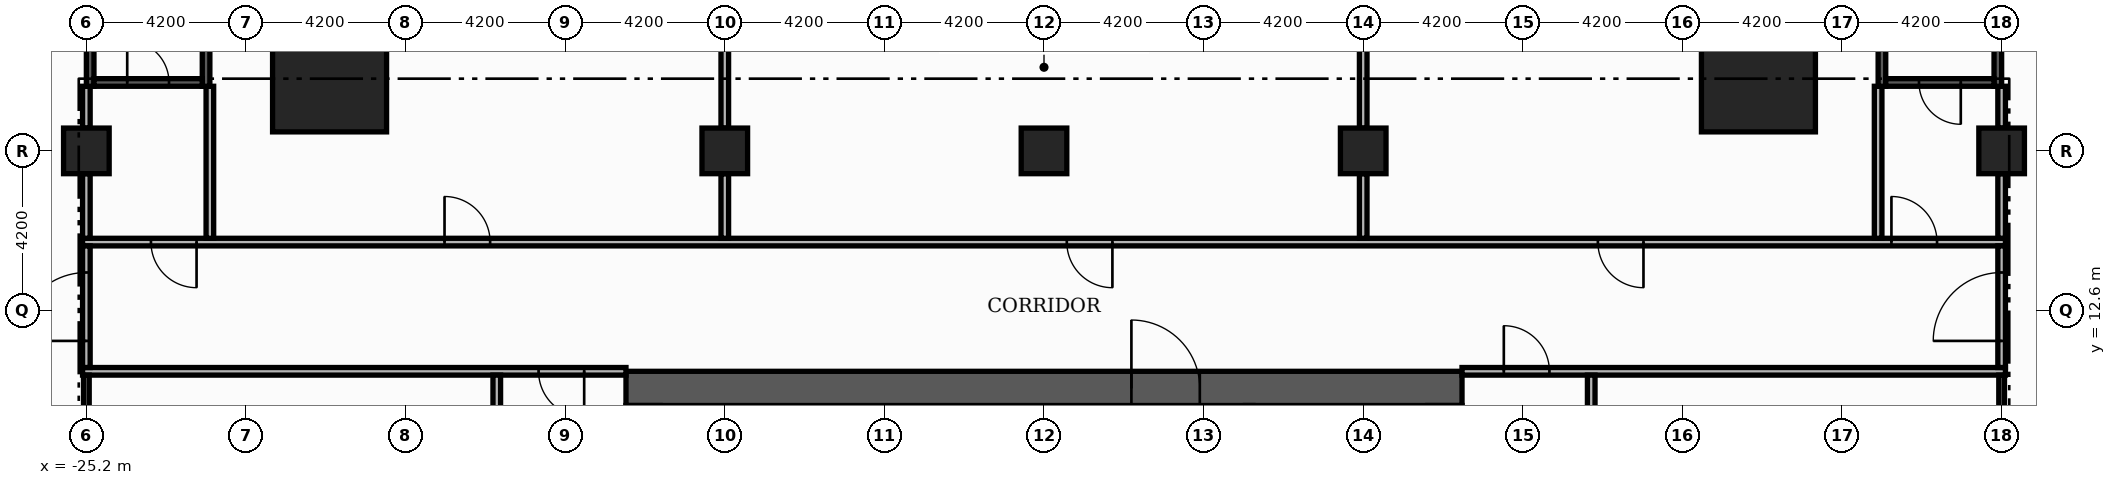
"""IFC4 building model, lengths in metres.
Left out: names, types, materials, properties, quantities, classifications, styles, units other than length and angle.
Written with IfcOpenShell. Run it as: python <this file> out.ifc"""

import sys

from ifc_helpers import new_model, si_unit, direction, frame, frame_2d, origin, origin_2d, place, context, subcontext, project, spatial, rectangle, extrude, element, fill, save


model = new_model("IFC4")
c1 = context("Model", 3, precision=1e-05, world=origin(), true_north=direction((0.0, 1.0)))
c2 = subcontext(c1, "Body", "Model", "MODEL_VIEW")
j1 = project(units=[si_unit("LENGTHUNIT", "METRE"), si_unit("PLANEANGLEUNIT", "RADIAN")], contexts=[c1])
p1 = place(None, origin())
s1 = spatial("IfcSite", under=j1, at=p1, CompositionType="ELEMENT")
p2 = place(p1, origin())
s2 = spatial("IfcBuilding", under=s1, at=p2, CompositionType="ELEMENT")
p3 = place(p2, frame((0.0, 0.0, -4.2)))
s3 = spatial("IfcBuildingStorey", under=s2, at=p3, CompositionType="ELEMENT", Elevation=-4.2)
p4 = place(p3, frame((-11.0, 10.55, 0.0), z_axis=(0.0, 0.0, 1.0), x_axis=(1.0, 0.0, 0.0)))
e1 = element("IfcWall", 1, at=p4, inside=s3, PredefinedType="SHEAR", context=c2, shape_type="SweptSolid", body=[
    extrude(rectangle(XDim=22.0, YDim=0.9, at=frame_2d((11.0, 0.0))), origin(), (0.0, 0.0, 1.0), 3.78),
])
p5 = place(p4, frame((13.3, 0.0, 0.0)))
e2 = element("IfcOpeningElement", 2, at=p5, cuts=e1, PredefinedType="OPENING", context=c2, shape_type="SweptSolid", body=[
    extrude(rectangle(XDim=1.8, YDim=2.2, at=frame_2d((0.9, 1.1))), frame((0.0, 0.46, 0.0), z_axis=(0.0, -1.0, 0.0), x_axis=(1.0, 0.0, 0.0)), (0.0, 0.0, 1.0), 0.92),
])
for number, where, z_axis, x_axis in (
    (3, (18.8, 18.8, 0.0), (0.0, 0.0, 1.0), (1.0, 0.0, 0.0)),
    (4, (-18.8, 18.8, 0.0), (0.0, 0.0, 1.0), (1.0, 0.0, 0.0)),
):
    element("IfcColumn", number, at=place(p3, frame(where, z_axis=z_axis, x_axis=x_axis)), inside=s3, PredefinedType="COLUMN", context=c2, shape_type="SweptSolid", body=[
        extrude(rectangle(XDim=3.0, YDim=3.0, at=origin_2d()), origin(), (0.0, 0.0, 1.0), 4.2),
    ])
for number, where, z_axis, x_axis in (
    (5, (25.2, 16.8, 0.0), (0.0, 0.0, 1.0), (1.0, 0.0, 0.0)),
    (6, (-25.2, 16.8, 0.0), (0.0, 0.0, 1.0), (1.0, 0.0, 0.0)),
    (7, (0.0, 16.8, 0.0), (0.0, 0.0, 1.0), (1.0, 0.0, 0.0)),
    (8, (8.4, 16.8, 0.0), (0.0, 0.0, 1.0), (1.0, 0.0, 0.0)),
    (9, (-8.4, 16.8, 0.0), (0.0, 0.0, 1.0), (1.0, 0.0, 0.0)),
):
    element("IfcColumn", number, at=place(p3, frame(where, z_axis=z_axis, x_axis=x_axis)), inside=s3, PredefinedType="COLUMN", context=c2, shape_type="SweptSolid", body=[
        extrude(rectangle(XDim=1.2, YDim=1.2, at=origin_2d()), origin(), (0.0, 0.0, 1.0), 4.2),
    ])
p6 = place(p3, frame((-25.3, 11.0, 0.0), z_axis=(0.0, 0.0, 1.0), x_axis=(1.0, 0.0, 0.0)))
e10 = element("IfcWall", 10, at=p6, inside=s3, PredefinedType="PARTITIONING", context=c2, shape_type="SweptSolid", body=[
    extrude(rectangle(XDim=14.3, YDim=0.2, at=frame_2d((7.15, 0.0))), origin(), (0.0, 0.0, 1.0), 3.78),
])
p7 = place(p6, frame((12.0, 0.0, 0.0)))
e11 = element("IfcOpeningElement", 11, at=p7, cuts=e10, PredefinedType="OPENING", context=c2, shape_type="SweptSolid", body=[
    extrude(rectangle(XDim=1.2, YDim=2.2, at=frame_2d((0.6, 1.1))), frame((0.0, 0.11, 0.0), z_axis=(0.0, -1.0, 0.0), x_axis=(1.0, 0.0, 0.0)), (0.0, 0.0, 1.0), 0.22),
])
p8 = place(p3, frame((11.0, 11.0, 0.0), z_axis=(0.0, 0.0, 1.0), x_axis=(1.0, 0.0, 0.0)))
e12 = element("IfcWall", 12, at=p8, inside=s3, PredefinedType="PARTITIONING", context=c2, shape_type="SweptSolid", body=[
    extrude(rectangle(XDim=14.3, YDim=0.2, at=frame_2d((7.15, 0.0))), origin(), (0.0, 0.0, 1.0), 3.78),
])
p9 = place(p8, frame((1.1, 0.0, 0.0)))
e13 = element("IfcOpeningElement", 13, at=p9, cuts=e12, PredefinedType="OPENING", context=c2, shape_type="SweptSolid", body=[
    extrude(rectangle(XDim=1.2, YDim=2.2, at=frame_2d((0.6, 1.1))), frame((0.0, 0.11, 0.0), z_axis=(0.0, -1.0, 0.0), x_axis=(1.0, 0.0, 0.0)), (0.0, 0.0, 1.0), 0.22),
])
p10 = place(p3, frame((-25.3, 14.4, 0.0), z_axis=(0.0, 0.0, 1.0), x_axis=(1.0, 0.0, 0.0)))
e14 = element("IfcWall", 14, at=p10, inside=s3, PredefinedType="PARTITIONING", context=c2, shape_type="SweptSolid", body=[
    extrude(rectangle(XDim=50.6, YDim=0.2, at=frame_2d((25.3, 0.0))), origin(), (0.0, 0.0, 1.0), 3.78),
])
p11 = place(p10, frame((1.8, 0.0, 0.0)))
e15 = element("IfcOpeningElement", 15, at=p11, cuts=e14, PredefinedType="OPENING", context=c2, shape_type="SweptSolid", body=[
    extrude(rectangle(XDim=1.2, YDim=2.2, at=frame_2d((0.6, 1.1))), frame((0.0, 0.11, 0.0), z_axis=(0.0, -1.0, 0.0), x_axis=(1.0, 0.0, 0.0)), (0.0, 0.0, 1.0), 0.22),
])
p12 = place(p10, frame((9.525, 0.0, 0.0)))
e16 = element("IfcOpeningElement", 16, at=p12, cuts=e14, PredefinedType="OPENING", context=c2, shape_type="SweptSolid", body=[
    extrude(rectangle(XDim=1.2, YDim=2.2, at=frame_2d((0.6, 1.1))), frame((0.0, 0.11, 0.0), z_axis=(0.0, -1.0, 0.0), x_axis=(1.0, 0.0, 0.0)), (0.0, 0.0, 1.0), 0.22),
])
p13 = place(p10, frame((25.9, 0.0, 0.0)))
e17 = element("IfcOpeningElement", 17, at=p13, cuts=e14, PredefinedType="OPENING", context=c2, shape_type="SweptSolid", body=[
    extrude(rectangle(XDim=1.2, YDim=2.2, at=frame_2d((0.6, 1.1))), frame((0.0, 0.11, 0.0), z_axis=(0.0, -1.0, 0.0), x_axis=(1.0, 0.0, 0.0)), (0.0, 0.0, 1.0), 0.22),
])
p14 = place(p10, frame((39.875, 0.0, 0.0)))
e18 = element("IfcOpeningElement", 18, at=p14, cuts=e14, PredefinedType="OPENING", context=c2, shape_type="SweptSolid", body=[
    extrude(rectangle(XDim=1.2, YDim=2.2, at=frame_2d((0.6, 1.1))), frame((0.0, 0.11, 0.0), z_axis=(0.0, -1.0, 0.0), x_axis=(1.0, 0.0, 0.0)), (0.0, 0.0, 1.0), 0.22),
])
p15 = place(p10, frame((47.6, 0.0, 0.0)))
e19 = element("IfcOpeningElement", 19, at=p15, cuts=e14, PredefinedType="OPENING", context=c2, shape_type="SweptSolid", body=[
    extrude(rectangle(XDim=1.2, YDim=2.2, at=frame_2d((0.6, 1.1))), frame((0.0, 0.11, 0.0), z_axis=(0.0, -1.0, 0.0), x_axis=(1.0, 0.0, 0.0)), (0.0, 0.0, 1.0), 0.22),
])
p16 = place(p3, frame((-25.2, 9.0, 0.0), z_axis=(0.0, 0.0, 1.0), x_axis=(0.0, 1.0, 0.0)))
e20 = element("IfcWall", 20, at=p16, inside=s3, PredefinedType="PARTITIONING", context=c2, shape_type="SweptSolid", body=[
    extrude(rectangle(XDim=1.9, YDim=0.15, at=frame_2d((0.95, 0.0))), origin(), (0.0, 0.0, 1.0), 3.78),
])
p17 = place(p3, frame((-25.2, 11.1, 0.0), z_axis=(0.0, 0.0, 1.0), x_axis=(0.0, 1.0, 0.0)))
e21 = element("IfcWall", 21, at=p17, inside=s3, PredefinedType="PARTITIONING", context=c2, shape_type="SweptSolid", body=[
    extrude(rectangle(XDim=3.2, YDim=0.2, at=frame_2d((1.6, 0.0))), origin(), (0.0, 0.0, 1.0), 3.78),
])
p18 = place(p17, frame((0.7, 0.0, 0.0)))
e22 = element("IfcOpeningElement", 22, at=p18, cuts=e21, PredefinedType="OPENING", context=c2, shape_type="SweptSolid", body=[
    extrude(rectangle(XDim=1.8, YDim=2.2, at=frame_2d((0.9, 1.1))), frame((0.0, 0.11, 0.0), z_axis=(0.0, -1.0, 0.0), x_axis=(1.0, 0.0, 0.0)), (0.0, 0.0, 1.0), 0.22),
])
p19 = place(p3, frame((-25.2, 14.5, 0.0), z_axis=(0.0, 0.0, 1.0), x_axis=(0.0, 1.0, 0.0)))
e23 = element("IfcWall", 23, at=p19, inside=s3, PredefinedType="PARTITIONING", context=c2, shape_type="SweptSolid", body=[
    extrude(rectangle(XDim=1.7, YDim=0.2, at=frame_2d((0.85, 0.0))), origin(), (0.0, 0.0, 1.0), 3.78),
])
p20 = place(p3, frame((-25.2, 17.4, 0.0), z_axis=(0.0, 0.0, 1.0), x_axis=(0.0, 1.0, 0.0)))
e24 = element("IfcWall", 24, at=p20, inside=s3, PredefinedType="PARTITIONING", context=c2, shape_type="SweptSolid", body=[
    extrude(rectangle(XDim=1.1, YDim=0.2, at=frame_2d((0.55, 0.0))), origin(), (0.0, 0.0, 1.0), 3.78),
])
p21 = place(p3, frame((-21.95, 14.5, 0.0), z_axis=(0.0, 0.0, 1.0), x_axis=(0.0, 1.0, 0.0)))
e25 = element("IfcWall", 25, at=p21, inside=s3, PredefinedType="PARTITIONING", context=c2, shape_type="SweptSolid", body=[
    extrude(rectangle(XDim=4.0, YDim=0.2, at=frame_2d((2.0, 0.0))), origin(), (0.0, 0.0, 1.0), 3.78),
])
p22 = place(p3, frame((-14.4, -10.9, 0.0), z_axis=(0.0, 0.0, 1.0), x_axis=(0.0, 1.0, 0.0)))
e26 = element("IfcWall", 26, at=p22, inside=s3, PredefinedType="PARTITIONING", context=c2, shape_type="SweptSolid", body=[
    extrude(rectangle(XDim=21.8, YDim=0.2, at=frame_2d((10.9, 0.0))), origin(), (0.0, 0.0, 1.0), 3.78),
])
p23 = place(p22, frame((4.8, 0.0, 0.0)))
e27 = element("IfcOpeningElement", 27, at=p23, cuts=e26, PredefinedType="OPENING", context=c2, shape_type="SweptSolid", body=[
    extrude(rectangle(XDim=1.2, YDim=2.2, at=frame_2d((0.6, 1.1))), frame((0.0, 0.11, 0.0), z_axis=(0.0, -1.0, 0.0), x_axis=(1.0, 0.0, 0.0)), (0.0, 0.0, 1.0), 0.22),
])
p24 = place(p22, frame((15.8, 0.0, 0.0)))
e28 = element("IfcOpeningElement", 28, at=p24, cuts=e26, PredefinedType="OPENING", context=c2, shape_type="SweptSolid", body=[
    extrude(rectangle(XDim=1.2, YDim=2.2, at=frame_2d((0.6, 1.1))), frame((0.0, 0.11, 0.0), z_axis=(0.0, -1.0, 0.0), x_axis=(1.0, 0.0, 0.0)), (0.0, 0.0, 1.0), 0.22),
])
p25 = place(p3, frame((-8.4, 14.5, 0.0), z_axis=(0.0, 0.0, 1.0), x_axis=(0.0, 1.0, 0.0)))
e29 = element("IfcWall", 29, at=p25, inside=s3, PredefinedType="PARTITIONING", context=c2, shape_type="SweptSolid", body=[
    extrude(rectangle(XDim=1.7, YDim=0.2, at=frame_2d((0.85, 0.0))), origin(), (0.0, 0.0, 1.0), 3.78),
])
p26 = place(p3, frame((-8.4, 17.4, 0.0), z_axis=(0.0, 0.0, 1.0), x_axis=(0.0, 1.0, 0.0)))
e30 = element("IfcWall", 30, at=p26, inside=s3, PredefinedType="PARTITIONING", context=c2, shape_type="SweptSolid", body=[
    extrude(rectangle(XDim=7.2, YDim=0.2, at=frame_2d((3.6, 0.0))), origin(), (0.0, 0.0, 1.0), 3.78),
])
p27 = place(p3, frame((8.4, 14.5, 0.0), z_axis=(0.0, 0.0, 1.0), x_axis=(0.0, 1.0, 0.0)))
e31 = element("IfcWall", 31, at=p27, inside=s3, PredefinedType="PARTITIONING", context=c2, shape_type="SweptSolid", body=[
    extrude(rectangle(XDim=1.7, YDim=0.2, at=frame_2d((0.85, 0.0))), origin(), (0.0, 0.0, 1.0), 3.78),
])
p28 = place(p3, frame((8.4, 17.4, 0.0), z_axis=(0.0, 0.0, 1.0), x_axis=(0.0, 1.0, 0.0)))
e32 = element("IfcWall", 32, at=p28, inside=s3, PredefinedType="PARTITIONING", context=c2, shape_type="SweptSolid", body=[
    extrude(rectangle(XDim=7.2, YDim=0.2, at=frame_2d((3.6, 0.0))), origin(), (0.0, 0.0, 1.0), 3.78),
])
p29 = place(p3, frame((14.4, -10.9, 0.0), z_axis=(0.0, 0.0, 1.0), x_axis=(0.0, 1.0, 0.0)))
e33 = element("IfcWall", 33, at=p29, inside=s3, PredefinedType="PARTITIONING", context=c2, shape_type="SweptSolid", body=[
    extrude(rectangle(XDim=21.8, YDim=0.2, at=frame_2d((10.9, 0.0))), origin(), (0.0, 0.0, 1.0), 3.78),
])
p30 = place(p29, frame((4.8, 0.0, 0.0)))
e34 = element("IfcOpeningElement", 34, at=p30, cuts=e33, PredefinedType="OPENING", context=c2, shape_type="SweptSolid", body=[
    extrude(rectangle(XDim=1.2, YDim=2.2, at=frame_2d((0.6, 1.1))), frame((0.0, 0.11, 0.0), z_axis=(0.0, -1.0, 0.0), x_axis=(1.0, 0.0, 0.0)), (0.0, 0.0, 1.0), 0.22),
])
p31 = place(p29, frame((15.8, 0.0, 0.0)))
e35 = element("IfcOpeningElement", 35, at=p31, cuts=e33, PredefinedType="OPENING", context=c2, shape_type="SweptSolid", body=[
    extrude(rectangle(XDim=1.2, YDim=2.2, at=frame_2d((0.6, 1.1))), frame((0.0, 0.11, 0.0), z_axis=(0.0, -1.0, 0.0), x_axis=(1.0, 0.0, 0.0)), (0.0, 0.0, 1.0), 0.22),
])
p32 = place(p3, frame((21.95, 14.5, 0.0), z_axis=(0.0, 0.0, 1.0), x_axis=(0.0, 1.0, 0.0)))
e36 = element("IfcWall", 36, at=p32, inside=s3, PredefinedType="PARTITIONING", context=c2, shape_type="SweptSolid", body=[
    extrude(rectangle(XDim=4.0, YDim=0.2, at=frame_2d((2.0, 0.0))), origin(), (0.0, 0.0, 1.0), 3.78),
])
p33 = place(p3, frame((25.2, 9.0, 0.0), z_axis=(0.0, 0.0, 1.0), x_axis=(0.0, 1.0, 0.0)))
e37 = element("IfcWall", 37, at=p33, inside=s3, PredefinedType="PARTITIONING", context=c2, shape_type="SweptSolid", body=[
    extrude(rectangle(XDim=1.9, YDim=0.15, at=frame_2d((0.95, 0.0))), origin(), (0.0, 0.0, 1.0), 3.78),
])
p34 = place(p3, frame((25.2, 11.1, 0.0), z_axis=(0.0, 0.0, 1.0), x_axis=(0.0, 1.0, 0.0)))
e38 = element("IfcWall", 38, at=p34, inside=s3, PredefinedType="PARTITIONING", context=c2, shape_type="SweptSolid", body=[
    extrude(rectangle(XDim=3.2, YDim=0.2, at=frame_2d((1.6, 0.0))), origin(), (0.0, 0.0, 1.0), 3.78),
])
p35 = place(p34, frame((0.7, 0.0, 0.0)))
e39 = element("IfcOpeningElement", 39, at=p35, cuts=e38, PredefinedType="OPENING", context=c2, shape_type="SweptSolid", body=[
    extrude(rectangle(XDim=1.8, YDim=2.2, at=frame_2d((0.9, 1.1))), frame((0.0, 0.11, 0.0), z_axis=(0.0, -1.0, 0.0), x_axis=(1.0, 0.0, 0.0)), (0.0, 0.0, 1.0), 0.22),
])
p36 = place(p3, frame((25.2, 14.5, 0.0), z_axis=(0.0, 0.0, 1.0), x_axis=(0.0, 1.0, 0.0)))
e40 = element("IfcWall", 40, at=p36, inside=s3, PredefinedType="PARTITIONING", context=c2, shape_type="SweptSolid", body=[
    extrude(rectangle(XDim=1.7, YDim=0.2, at=frame_2d((0.85, 0.0))), origin(), (0.0, 0.0, 1.0), 3.78),
])
p37 = place(p3, frame((25.2, 17.4, 0.0), z_axis=(0.0, 0.0, 1.0), x_axis=(0.0, 1.0, 0.0)))
e41 = element("IfcWall", 41, at=p37, inside=s3, PredefinedType="PARTITIONING", context=c2, shape_type="SweptSolid", body=[
    extrude(rectangle(XDim=1.1, YDim=0.2, at=frame_2d((0.55, 0.0))), origin(), (0.0, 0.0, 1.0), 3.78),
])
p38 = place(p3, frame((22.05, 18.5, 0.0), z_axis=(0.0, 0.0, 1.0), x_axis=(0.0, 1.0, 0.0)))
e42 = element("IfcWall", 42, at=p38, inside=s3, PredefinedType="SOLIDWALL", context=c2, shape_type="SweptSolid", body=[
    extrude(rectangle(XDim=6.74, YDim=0.2, at=frame_2d((3.37, 0.0))), origin(), (0.0, 0.0, 1.0), 3.78),
])
p39 = place(p3, frame((25.1, 18.5, 0.0), z_axis=(0.0, 0.0, 1.0), x_axis=(0.0, 1.0, 0.0)))
e43 = element("IfcWall", 43, at=p39, inside=s3, PredefinedType="SOLIDWALL", context=c2, shape_type="SweptSolid", body=[
    extrude(rectangle(XDim=6.1, YDim=0.2, at=frame_2d((3.05, 0.0))), origin(), (0.0, 0.0, 1.0), 3.78),
])
p40 = place(p3, frame((22.15, 18.6, 0.0), z_axis=(0.0, 0.0, 1.0), x_axis=(1.0, 0.0, 0.0)))
e44 = element("IfcWall", 44, at=p40, inside=s3, PredefinedType="SOLIDWALL", context=c2, shape_type="SweptSolid", body=[
    extrude(rectangle(XDim=2.85, YDim=0.2, at=frame_2d((1.425, 0.0))), origin(), (0.0, 0.0, 1.0), 3.78),
])
p41 = place(p40, frame((0.875, 0.0, 0.0)))
e45 = element("IfcOpeningElement", 45, at=p41, cuts=e44, PredefinedType="OPENING", context=c2, shape_type="SweptSolid", body=[
    extrude(rectangle(XDim=1.1, YDim=2.2, at=frame_2d((0.55, 1.1))), frame((0.0, 0.11, 0.0), z_axis=(0.0, -1.0, 0.0), x_axis=(1.0, 0.0, 0.0)), (0.0, 0.0, 1.0), 0.22),
])
p42 = place(p3, frame((-25.1, 18.5, 0.0), z_axis=(0.0, 0.0, 1.0), x_axis=(0.0, 1.0, 0.0)))
e46 = element("IfcWall", 46, at=p42, inside=s3, PredefinedType="SOLIDWALL", context=c2, shape_type="SweptSolid", body=[
    extrude(rectangle(XDim=6.1, YDim=0.2, at=frame_2d((3.05, 0.0))), origin(), (0.0, 0.0, 1.0), 3.78),
])
p43 = place(p3, frame((-22.05, 18.5, 0.0), z_axis=(0.0, 0.0, 1.0), x_axis=(0.0, 1.0, 0.0)))
e47 = element("IfcWall", 47, at=p43, inside=s3, PredefinedType="SOLIDWALL", context=c2, shape_type="SweptSolid", body=[
    extrude(rectangle(XDim=6.74, YDim=0.2, at=frame_2d((3.37, 0.0))), origin(), (0.0, 0.0, 1.0), 3.78),
])
p44 = place(p3, frame((-25.0, 18.6, 0.0), z_axis=(0.0, 0.0, 1.0), x_axis=(1.0, 0.0, 0.0)))
e48 = element("IfcWall", 48, at=p44, inside=s3, PredefinedType="SOLIDWALL", context=c2, shape_type="SweptSolid", body=[
    extrude(rectangle(XDim=2.85, YDim=0.2, at=frame_2d((1.425, 0.0))), origin(), (0.0, 0.0, 1.0), 3.78),
])
p45 = place(p44, frame((0.875, 0.0, 0.0)))
e49 = element("IfcOpeningElement", 49, at=p45, cuts=e48, PredefinedType="OPENING", context=c2, shape_type="SweptSolid", body=[
    extrude(rectangle(XDim=1.1, YDim=2.2, at=frame_2d((0.55, 1.1))), frame((0.0, 0.11, 0.0), z_axis=(0.0, -1.0, 0.0), x_axis=(1.0, 0.0, 0.0)), (0.0, 0.0, 1.0), 0.22),
])
p46 = place(p5, origin())
e50 = element("IfcDoor", 50, at=p46, inside=s3, OperationType="DOUBLE_DOOR_SINGLE_SWING", PredefinedType="DOOR", context=c2, shape_type="SweptSolid", body=[
    extrude(rectangle(XDim=1.8, YDim=2.2, at=frame_2d((0.9, 1.1))), frame((0.0, 0.025, 0.0), z_axis=(0.0, -1.0, 0.0), x_axis=(1.0, 0.0, 0.0)), (0.0, 0.0, 1.0), 0.05),
])
fill(e2, e50)
p47 = place(p7, origin())
e51 = element("IfcDoor", 51, at=p47, inside=s3, OperationType="SINGLE_SWING_RIGHT", PredefinedType="DOOR", context=c2, shape_type="SweptSolid", body=[
    extrude(rectangle(XDim=1.2, YDim=2.2, at=frame_2d((0.6, 1.1))), frame((0.0, 0.025, 0.0), z_axis=(0.0, -1.0, 0.0), x_axis=(1.0, 0.0, 0.0)), (0.0, 0.0, 1.0), 0.05),
])
fill(e11, e51)
p48 = place(p9, origin())
e52 = element("IfcDoor", 52, at=p48, inside=s3, OperationType="SINGLE_SWING_LEFT", PredefinedType="DOOR", context=c2, shape_type="SweptSolid", body=[
    extrude(rectangle(XDim=1.2, YDim=2.2, at=frame_2d((0.6, 1.1))), frame((0.0, 0.025, 0.0), z_axis=(0.0, -1.0, 0.0), x_axis=(1.0, 0.0, 0.0)), (0.0, 0.0, 1.0), 0.05),
])
fill(e13, e52)
p49 = place(p18, origin())
e53 = element("IfcDoor", 53, at=p49, inside=s3, OperationType="DOUBLE_DOOR_SINGLE_SWING", PredefinedType="DOOR", context=c2, shape_type="SweptSolid", body=[
    extrude(rectangle(XDim=1.8, YDim=2.2, at=frame_2d((0.9, 1.1))), frame((0.0, 0.025, 0.0), z_axis=(0.0, -1.0, 0.0), x_axis=(1.0, 0.0, 0.0)), (0.0, 0.0, 1.0), 0.05),
])
fill(e22, e53)
p50 = place(p35, origin())
e54 = element("IfcDoor", 54, at=p50, inside=s3, OperationType="DOUBLE_DOOR_SINGLE_SWING", PredefinedType="DOOR", context=c2, shape_type="SweptSolid", body=[
    extrude(rectangle(XDim=1.8, YDim=2.2, at=frame_2d((0.9, 1.1))), frame((0.0, 0.025, 0.0), z_axis=(0.0, -1.0, 0.0), x_axis=(1.0, 0.0, 0.0)), (0.0, 0.0, 1.0), 0.05),
])
fill(e39, e54)
p51 = place(p11, origin())
e55 = element("IfcDoor", 55, at=p51, inside=s3, OperationType="SINGLE_SWING_RIGHT", PredefinedType="DOOR", context=c2, shape_type="SweptSolid", body=[
    extrude(rectangle(XDim=1.2, YDim=2.2, at=frame_2d((0.6, 1.1))), frame((0.0, 0.025, 0.0), z_axis=(0.0, -1.0, 0.0), x_axis=(1.0, 0.0, 0.0)), (0.0, 0.0, 1.0), 0.05),
])
fill(e15, e55)
p52 = place(p12, origin())
e56 = element("IfcDoor", 56, at=p52, inside=s3, OperationType="SINGLE_SWING_LEFT", PredefinedType="DOOR", context=c2, shape_type="SweptSolid", body=[
    extrude(rectangle(XDim=1.2, YDim=2.2, at=frame_2d((0.6, 1.1))), frame((0.0, 0.025, 0.0), z_axis=(0.0, -1.0, 0.0), x_axis=(1.0, 0.0, 0.0)), (0.0, 0.0, 1.0), 0.05),
])
fill(e16, e56)
p53 = place(p13, origin())
e57 = element("IfcDoor", 57, at=p53, inside=s3, OperationType="SINGLE_SWING_RIGHT", PredefinedType="DOOR", context=c2, shape_type="SweptSolid", body=[
    extrude(rectangle(XDim=1.2, YDim=2.2, at=frame_2d((0.6, 1.1))), frame((0.0, 0.025, 0.0), z_axis=(0.0, -1.0, 0.0), x_axis=(1.0, 0.0, 0.0)), (0.0, 0.0, 1.0), 0.05),
])
fill(e17, e57)
p54 = place(p14, origin())
e58 = element("IfcDoor", 58, at=p54, inside=s3, OperationType="SINGLE_SWING_RIGHT", PredefinedType="DOOR", context=c2, shape_type="SweptSolid", body=[
    extrude(rectangle(XDim=1.2, YDim=2.2, at=frame_2d((0.6, 1.1))), frame((0.0, 0.025, 0.0), z_axis=(0.0, -1.0, 0.0), x_axis=(1.0, 0.0, 0.0)), (0.0, 0.0, 1.0), 0.05),
])
fill(e18, e58)
p55 = place(p15, origin())
e59 = element("IfcDoor", 59, at=p55, inside=s3, OperationType="SINGLE_SWING_LEFT", PredefinedType="DOOR", context=c2, shape_type="SweptSolid", body=[
    extrude(rectangle(XDim=1.2, YDim=2.2, at=frame_2d((0.6, 1.1))), frame((0.0, 0.025, 0.0), z_axis=(0.0, -1.0, 0.0), x_axis=(1.0, 0.0, 0.0)), (0.0, 0.0, 1.0), 0.05),
])
fill(e19, e59)
p56 = place(p41, origin())
e60 = element("IfcDoor", 60, at=p56, inside=s3, OperationType="SINGLE_SWING_RIGHT", PredefinedType="DOOR", context=c2, shape_type="SweptSolid", body=[
    extrude(rectangle(XDim=1.1, YDim=2.2, at=frame_2d((0.55, 1.1))), frame((0.0, 0.025, 0.0), z_axis=(0.0, -1.0, 0.0), x_axis=(1.0, 0.0, 0.0)), (0.0, 0.0, 1.0), 0.05),
])
fill(e45, e60)
p57 = place(p45, origin())
e61 = element("IfcDoor", 61, at=p57, inside=s3, OperationType="SINGLE_SWING_LEFT", PredefinedType="DOOR", context=c2, shape_type="SweptSolid", body=[
    extrude(rectangle(XDim=1.1, YDim=2.2, at=frame_2d((0.55, 1.1))), frame((0.0, 0.025, 0.0), z_axis=(0.0, -1.0, 0.0), x_axis=(1.0, 0.0, 0.0)), (0.0, 0.0, 1.0), 0.05),
])
fill(e49, e61)
save(model, sys.argv[1])
